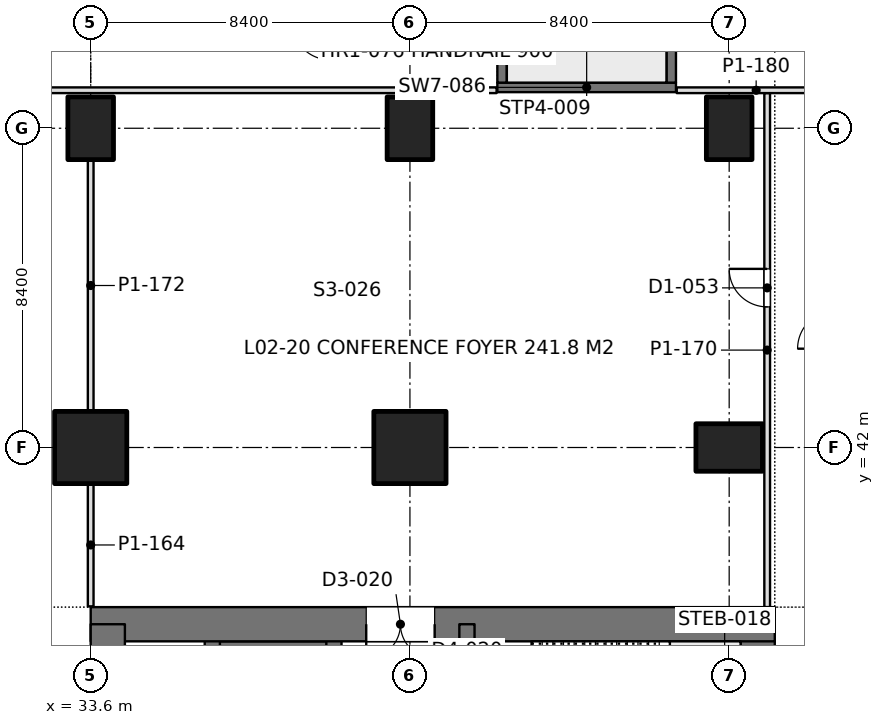
"""IFC4 building model, lengths in metres.
Left out: names, types, materials, properties, quantities, classifications, styles, units other than length and angle.
Written with IfcOpenShell. Run it as: python <this file> out.ifc"""

import sys

from ifc_helpers import new_model, si_unit, direction, frame, frame_2d, origin, origin_2d, place, context, subcontext, project, spatial, rectangle, extrude, element, fill, save


model = new_model("IFC4")
c1 = context("Model", 3, precision=1e-05, world=origin(), true_north=direction((0.0, 1.0)))
c2 = subcontext(c1, "Body", "Model", "MODEL_VIEW")
j1 = project(units=[si_unit("LENGTHUNIT", "METRE"), si_unit("PLANEANGLEUNIT", "RADIAN")], contexts=[c1])
p1 = place(None, origin())
s1 = spatial("IfcSite", under=j1, at=p1, CompositionType="ELEMENT")
p2 = place(p1, origin())
s2 = spatial("IfcBuilding", under=s1, at=p2, CompositionType="ELEMENT")
p3 = place(p2, frame((0.0, 0.0, 9.9)))
s3 = spatial("IfcBuildingStorey", under=s2, at=p3, CompositionType="ELEMENT", Elevation=9.9)
p4 = place(p3, frame((33.6, 42.0, 0.0), z_axis=(0.0, 0.0, 1.0), x_axis=(1.0, 0.0, 0.0)))
e1 = element("IfcColumn", 1, at=p4, inside=s3, PredefinedType="COLUMN", context=c2, shape_type="SweptSolid", body=[
    extrude(rectangle(XDim=1.9, YDim=1.9, at=origin_2d()), origin(), (0.0, 0.0, 1.0), 4.5),
])
p5 = place(p3, frame((33.6, 50.4, 0.0), z_axis=(0.0, 0.0, 1.0), x_axis=(1.0, 0.0, 0.0)))
e2 = element("IfcColumn", 2, at=p5, inside=s3, PredefinedType="COLUMN", context=c2, shape_type="SweptSolid", body=[
    extrude(rectangle(XDim=1.2, YDim=1.65, at=origin_2d()), origin(), (0.0, 0.0, 1.0), 4.5),
])
p6 = place(p3, frame((42.0, 42.0, 0.0), z_axis=(0.0, 0.0, 1.0), x_axis=(1.0, 0.0, 0.0)))
e3 = element("IfcColumn", 3, at=p6, inside=s3, PredefinedType="COLUMN", context=c2, shape_type="SweptSolid", body=[
    extrude(rectangle(XDim=1.9, YDim=1.9, at=origin_2d()), origin(), (0.0, 0.0, 1.0), 4.5),
])
p7 = place(p3, frame((42.0, 50.4, 0.0), z_axis=(0.0, 0.0, 1.0), x_axis=(1.0, 0.0, 0.0)))
e4 = element("IfcColumn", 4, at=p7, inside=s3, PredefinedType="COLUMN", context=c2, shape_type="SweptSolid", body=[
    extrude(rectangle(XDim=1.2, YDim=1.65, at=origin_2d()), origin(), (0.0, 0.0, 1.0), 4.5),
])
p8 = place(p3, frame((50.4, 42.0, 0.0), z_axis=(0.0, 0.0, 1.0), x_axis=(0.0, 1.0, 0.0)))
e5 = element("IfcColumn", 5, at=p8, inside=s3, PredefinedType="COLUMN", context=c2, shape_type="SweptSolid", body=[
    extrude(rectangle(XDim=1.25, YDim=1.75, at=origin_2d()), origin(), (0.0, 0.0, 1.0), 4.5),
])
p9 = place(p3, frame((50.4, 50.4, 0.0), z_axis=(0.0, 0.0, 1.0), x_axis=(1.0, 0.0, 0.0)))
e6 = element("IfcColumn", 6, at=p9, inside=s3, PredefinedType="COLUMN", context=c2, shape_type="SweptSolid", body=[
    extrude(rectangle(XDim=1.2, YDim=1.65, at=origin_2d()), origin(), (0.0, 0.0, 1.0), 4.5),
])
p10 = place(p3, frame((33.6, 37.35, 0.0), z_axis=(0.0, 0.0, 1.0), x_axis=(1.0, 0.0, 0.0)))
e7 = element("IfcWall", 7, at=p10, inside=s3, PredefinedType="SHEAR", context=c2, shape_type="SweptSolid", body=[
    extrude(rectangle(XDim=18.0, YDim=0.9, at=frame_2d((9.0, 0.0))), origin(), (0.0, 0.0, 1.0), 4.5),
])
p11 = place(p10, frame((7.25, 0.0, 0.0)))
e8 = element("IfcOpeningElement", 8, at=p11, cuts=e7, PredefinedType="OPENING", context=c2, shape_type="SweptSolid", body=[
    extrude(rectangle(XDim=1.8, YDim=2.4, at=frame_2d((0.9, 1.2))), frame((0.0, 0.46, 0.0), z_axis=(0.0, -1.0, 0.0), x_axis=(1.0, 0.0, 0.0)), (0.0, 0.0, 1.0), 0.92),
])
for number, where, z_axis, x_axis in (
    (9, (34.05, 13.05, 0.0), (0.0, 0.0, 1.0), (0.0, 1.0, 0.0)),
    (10, (51.15, 13.05, 0.0), (0.0, 0.0, 1.0), (0.0, 1.0, 0.0)),
):
    element("IfcWall", number, at=place(p3, frame(where, z_axis=z_axis, x_axis=x_axis)), inside=s3, PredefinedType="SHEAR", context=c2, shape_type="SweptSolid", body=[
        extrude(rectangle(XDim=24.3, YDim=0.9, at=frame_2d((12.15, 0.0))), origin(), (0.0, 0.0, 1.0), 4.5),
    ])
p12 = place(p3, frame((43.5, 13.05, 0.0), z_axis=(0.0, 0.0, 1.0), x_axis=(0.0, 1.0, 0.0)))
e11 = element("IfcWall", 11, at=p12, inside=s3, PredefinedType="SHEAR", context=c2, shape_type="SweptSolid", body=[
    extrude(rectangle(XDim=24.3, YDim=0.4, at=frame_2d((12.15, 0.0))), origin(), (0.0, 0.0, 1.0), 4.5),
])
p13 = place(p12, frame((1.3, 0.0, 0.0)))
e12 = element("IfcOpeningElement", 12, at=p13, cuts=e11, PredefinedType="OPENING", context=c2, shape_type="SweptSolid", body=[
    extrude(rectangle(XDim=1.0, YDim=2.2, at=frame_2d((0.5, 1.1))), frame((0.0, 0.21, 0.0), z_axis=(0.0, -1.0, 0.0), x_axis=(1.0, 0.0, 0.0)), (0.0, 0.0, 1.0), 0.42),
])
p14 = place(p12, frame((22.0, 0.0, 0.0)))
e13 = element("IfcOpeningElement", 13, at=p14, cuts=e11, PredefinedType="OPENING", context=c2, shape_type="SweptSolid", body=[
    extrude(rectangle(XDim=1.0, YDim=2.2, at=frame_2d((0.5, 1.1))), frame((0.0, 0.21, 0.0), z_axis=(0.0, -1.0, 0.0), x_axis=(1.0, 0.0, 0.0)), (0.0, 0.0, 1.0), 0.42),
])
p15 = place(p12, frame((5.55, 0.0, 0.0)))
e14 = element("IfcOpeningElement", 14, at=p15, cuts=e11, PredefinedType="OPENING", context=c2, shape_type="SweptSolid", body=[
    extrude(rectangle(XDim=1.0, YDim=2.2, at=frame_2d((0.5, 1.1))), frame((0.0, 0.21, 0.0), z_axis=(0.0, -1.0, 0.0), x_axis=(1.0, 0.0, 0.0)), (0.0, 0.0, 1.0), 0.42),
])
p16 = place(p12, frame((9.55, 0.0, 0.0)))
e15 = element("IfcOpeningElement", 15, at=p16, cuts=e11, PredefinedType="OPENING", context=c2, shape_type="SweptSolid", body=[
    extrude(rectangle(XDim=1.0, YDim=2.2, at=frame_2d((0.5, 1.1))), frame((0.0, 0.21, 0.0), z_axis=(0.0, -1.0, 0.0), x_axis=(1.0, 0.0, 0.0)), (0.0, 0.0, 1.0), 0.42),
])
p17 = place(p12, frame((12.8, 0.0, 0.0)))
e16 = element("IfcOpeningElement", 16, at=p17, cuts=e11, PredefinedType="OPENING", context=c2, shape_type="SweptSolid", body=[
    extrude(rectangle(XDim=1.1, YDim=2.2, at=frame_2d((0.55, 1.1))), frame((0.0, 0.21, 0.0), z_axis=(0.0, -1.0, 0.0), x_axis=(1.0, 0.0, 0.0)), (0.0, 0.0, 1.0), 0.42),
])
p18 = place(p12, frame((15.538, 0.0, 0.0)))
e17 = element("IfcOpeningElement", 17, at=p18, cuts=e11, PredefinedType="OPENING", context=c2, shape_type="SweptSolid", body=[
    extrude(rectangle(XDim=1.1, YDim=2.2, at=frame_2d((0.55, 1.1))), frame((0.0, 0.21, 0.0), z_axis=(0.0, -1.0, 0.0), x_axis=(1.0, 0.0, 0.0)), (0.0, 0.0, 1.0), 0.42),
])
p19 = place(p12, frame((18.262, 0.0, 0.0)))
e18 = element("IfcOpeningElement", 18, at=p19, cuts=e11, PredefinedType="OPENING", context=c2, shape_type="SweptSolid", body=[
    extrude(rectangle(XDim=1.1, YDim=2.2, at=frame_2d((0.55, 1.1))), frame((0.0, 0.21, 0.0), z_axis=(0.0, -1.0, 0.0), x_axis=(1.0, 0.0, 0.0)), (0.0, 0.0, 1.0), 0.42),
])
p20 = place(p3, frame((40.0, 13.05, 0.0), z_axis=(0.0, 0.0, 1.0), x_axis=(0.0, 1.0, 0.0)))
e19 = element("IfcWall", 19, at=p20, inside=s3, PredefinedType="SHEAR", context=c2, shape_type="SweptSolid", body=[
    extrude(rectangle(XDim=24.3, YDim=0.4, at=frame_2d((12.15, 0.0))), origin(), (0.0, 0.0, 1.0), 4.5),
])
p21 = place(p20, frame((1.5, 0.0, 0.0)))
e20 = element("IfcOpeningElement", 20, at=p21, cuts=e19, PredefinedType="OPENING", context=c2, shape_type="SweptSolid", body=[
    extrude(rectangle(XDim=1.1, YDim=2.2, at=frame_2d((0.55, 1.1))), frame((0.0, 0.21, 0.0), z_axis=(0.0, -1.0, 0.0), x_axis=(1.0, 0.0, 0.0)), (0.0, 0.0, 1.0), 0.42),
])
p22 = place(p20, frame((4.35, 0.0, 0.0)))
e21 = element("IfcOpeningElement", 21, at=p22, cuts=e19, PredefinedType="OPENING", context=c2, shape_type="SweptSolid", body=[
    extrude(rectangle(XDim=1.1, YDim=2.2, at=frame_2d((0.55, 1.1))), frame((0.0, 0.21, 0.0), z_axis=(0.0, -1.0, 0.0), x_axis=(1.0, 0.0, 0.0)), (0.0, 0.0, 1.0), 0.42),
])
p23 = place(p20, frame((7.2, 0.0, 0.0)))
e22 = element("IfcOpeningElement", 22, at=p23, cuts=e19, PredefinedType="OPENING", context=c2, shape_type="SweptSolid", body=[
    extrude(rectangle(XDim=1.1, YDim=2.2, at=frame_2d((0.55, 1.1))), frame((0.0, 0.21, 0.0), z_axis=(0.0, -1.0, 0.0), x_axis=(1.0, 0.0, 0.0)), (0.0, 0.0, 1.0), 0.42),
])
p24 = place(p20, frame((21.45, 0.0, 0.0)))
e23 = element("IfcOpeningElement", 23, at=p24, cuts=e19, PredefinedType="OPENING", context=c2, shape_type="SweptSolid", body=[
    extrude(rectangle(XDim=1.1, YDim=2.2, at=frame_2d((0.55, 1.1))), frame((0.0, 0.21, 0.0), z_axis=(0.0, -1.0, 0.0), x_axis=(1.0, 0.0, 0.0)), (0.0, 0.0, 1.0), 0.42),
])
p25 = place(p3, frame((36.8, 13.05, 0.0), z_axis=(0.0, 0.0, 1.0), x_axis=(0.0, 1.0, 0.0)))
e24 = element("IfcWall", 24, at=p25, inside=s3, PredefinedType="SHEAR", context=c2, shape_type="SweptSolid", body=[
    extrude(rectangle(XDim=24.3, YDim=0.4, at=frame_2d((12.15, 0.0))), origin(), (0.0, 0.0, 1.0), 4.5),
])
p26 = place(p3, frame((40.0, 36.625, 0.0), z_axis=(0.0, 0.0, 1.0), x_axis=(-1.0, 0.0, 0.0)))
e25 = element("IfcWall", 25, at=p26, inside=s3, PredefinedType="SHEAR", context=c2, shape_type="SweptSolid", body=[
    extrude(rectangle(XDim=3.2, YDim=0.55, at=frame_2d((1.6, 0.0))), origin(), (0.0, 0.0, 1.0), 4.5),
])
p27 = place(p3, frame((6.12, 51.4, 0.0), z_axis=(0.0, 0.0, 1.0), x_axis=(1.0, 0.0, 0.0)))
e26 = element("IfcWall", 26, at=p27, inside=s3, PredefinedType="PARTITIONING", context=c2, shape_type="SweptSolid", body=[
    extrude(rectangle(XDim=38.16, YDim=0.15, at=frame_2d((19.08, 0.0))), origin(), (0.0, 0.0, 1.0), 3.65),
])
p28 = place(p27, frame((13.98, 0.0, 0.0)))
e27 = element("IfcOpeningElement", 27, at=p28, cuts=e26, PredefinedType="OPENING", context=c2, shape_type="SweptSolid", body=[
    extrude(rectangle(XDim=1.8, YDim=2.2, at=frame_2d((0.9, 1.1))), frame((0.0, 0.085, 0.0), z_axis=(0.0, -1.0, 0.0), x_axis=(1.0, 0.0, 0.0)), (0.0, 0.0, 1.0), 0.17),
])
p29 = place(p27, frame((22.38, 0.0, 0.0)))
e28 = element("IfcOpeningElement", 28, at=p29, cuts=e26, PredefinedType="OPENING", context=c2, shape_type="SweptSolid", body=[
    extrude(rectangle(XDim=1.8, YDim=2.2, at=frame_2d((0.9, 1.1))), frame((0.0, 0.085, 0.0), z_axis=(0.0, -1.0, 0.0), x_axis=(1.0, 0.0, 0.0)), (0.0, 0.0, 1.0), 0.17),
])
p30 = place(p3, frame((49.02, 51.4, 0.0), z_axis=(0.0, 0.0, 1.0), x_axis=(1.0, 0.0, 0.0)))
e29 = element("IfcWall", 29, at=p30, inside=s3, PredefinedType="PARTITIONING", context=c2, shape_type="SweptSolid", body=[
    extrude(rectangle(XDim=4.18, YDim=0.15, at=frame_2d((2.09, 0.0))), origin(), (0.0, 0.0, 1.0), 3.65),
])
p31 = place(p3, frame((51.4, 37.8, 0.0), z_axis=(0.0, 0.0, 1.0), x_axis=(0.0, 1.0, 0.0)))
e30 = element("IfcWall", 30, at=p31, inside=s3, PredefinedType="PARTITIONING", context=c2, shape_type="SweptSolid", body=[
    extrude(rectangle(XDim=13.526, YDim=0.15, at=frame_2d((6.763, 0.0))), origin(), (0.0, 0.0, 1.0), 3.65),
])
p32 = place(p31, frame((7.9, 0.0, 0.0)))
e31 = element("IfcOpeningElement", 31, at=p32, cuts=e30, PredefinedType="OPENING", context=c2, shape_type="SweptSolid", body=[
    extrude(rectangle(XDim=1.0, YDim=2.2, at=frame_2d((0.5, 1.1))), frame((0.0, 0.085, 0.0), z_axis=(0.0, -1.0, 0.0), x_axis=(1.0, 0.0, 0.0)), (0.0, 0.0, 1.0), 0.17),
])
p33 = place(p3, frame((33.6, 37.82, 0.0), z_axis=(0.0, 0.0, 1.0), x_axis=(0.0, 1.0, 0.0)))
e32 = element("IfcWall", 32, at=p33, inside=s3, PredefinedType="PARTITIONING", context=c2, shape_type="SweptSolid", body=[
    extrude(rectangle(XDim=3.231, YDim=0.15, at=frame_2d((1.615, 0.0))), origin(), (0.0, 0.0, 1.0), 3.94),
])
p34 = place(p3, frame((33.6, 42.949, 0.0), z_axis=(0.0, 0.0, 1.0), x_axis=(0.0, 1.0, 0.0)))
e33 = element("IfcWall", 33, at=p34, inside=s3, PredefinedType="PARTITIONING", context=c2, shape_type="SweptSolid", body=[
    extrude(rectangle(XDim=6.627, YDim=0.15, at=frame_2d((3.313, 0.0))), origin(), (0.0, 0.0, 1.0), 3.65),
])
p35 = place(p3, frame((44.425, 59.702, 0.0), z_axis=(0.0, 0.0, 1.0), x_axis=(0.0, -1.0, 0.0)))
e34 = element("IfcWall", 34, at=p35, inside=s3, PredefinedType="SOLIDWALL", context=c2, shape_type="SweptSolid", body=[
    extrude(rectangle(XDim=8.102, YDim=0.25, at=frame_2d((4.051, 0.0))), origin(), (0.0, 0.0, 1.0), 4.5),
])
p36 = place(p35, frame((0.15, 0.0, 0.0)))
e35 = element("IfcOpeningElement", 35, at=p36, cuts=e34, PredefinedType="OPENING", context=c2, shape_type="SweptSolid", body=[
    extrude(rectangle(XDim=2.0, YDim=2.2, at=frame_2d((1.0, 1.1))), frame((0.0, 0.135, 0.0), z_axis=(0.0, -1.0, 0.0), x_axis=(1.0, 0.0, 0.0)), (0.0, 0.0, 1.0), 0.27),
])
p37 = place(p3, frame((48.875, 59.702, 0.0), z_axis=(0.0, 0.0, 1.0), x_axis=(0.0, -1.0, 0.0)))
e36 = element("IfcWall", 36, at=p37, inside=s3, PredefinedType="SOLIDWALL", context=c2, shape_type="SweptSolid", body=[
    extrude(rectangle(XDim=8.102, YDim=0.25, at=frame_2d((4.051, 0.0))), origin(), (0.0, 0.0, 1.0), 4.5),
])
p38 = place(p3, frame((44.3, 51.475, 0.0), z_axis=(0.0, 0.0, 1.0), x_axis=(1.0, 0.0, 0.0)))
e37 = element("IfcWall", 37, at=p38, inside=s3, PredefinedType="SOLIDWALL", context=c2, shape_type="SweptSolid", body=[
    extrude(rectangle(XDim=4.7, YDim=0.25, at=frame_2d((2.35, 0.0))), origin(), (0.0, 0.0, 1.0), 4.5),
])
p39 = place(p11, frame((1.8, 0.0, 0.0), z_axis=(0.0, 0.0, 1.0), x_axis=(-1.0, 0.0, 0.0)))
e38 = element("IfcDoor", 38, at=p39, inside=s3, OperationType="DOUBLE_DOOR_SINGLE_SWING", PredefinedType="DOOR", context=c2, shape_type="SweptSolid", body=[
    extrude(rectangle(XDim=1.8, YDim=2.4, at=frame_2d((0.9, 1.2))), frame((0.0, 0.025, 0.0), z_axis=(0.0, -1.0, 0.0), x_axis=(1.0, 0.0, 0.0)), (0.0, 0.0, 1.0), 0.05),
])
fill(e8, e38)
p40 = place(p32, origin())
e39 = element("IfcDoor", 39, at=p40, inside=s3, OperationType="SINGLE_SWING_RIGHT", PredefinedType="DOOR", context=c2, shape_type="SweptSolid", body=[
    extrude(rectangle(XDim=1.0, YDim=2.2, at=frame_2d((0.5, 1.1))), frame((0.0, 0.025, 0.0), z_axis=(0.0, -1.0, 0.0), x_axis=(1.0, 0.0, 0.0)), (0.0, 0.0, 1.0), 0.05),
])
fill(e31, e39)
save(model, sys.argv[1])
